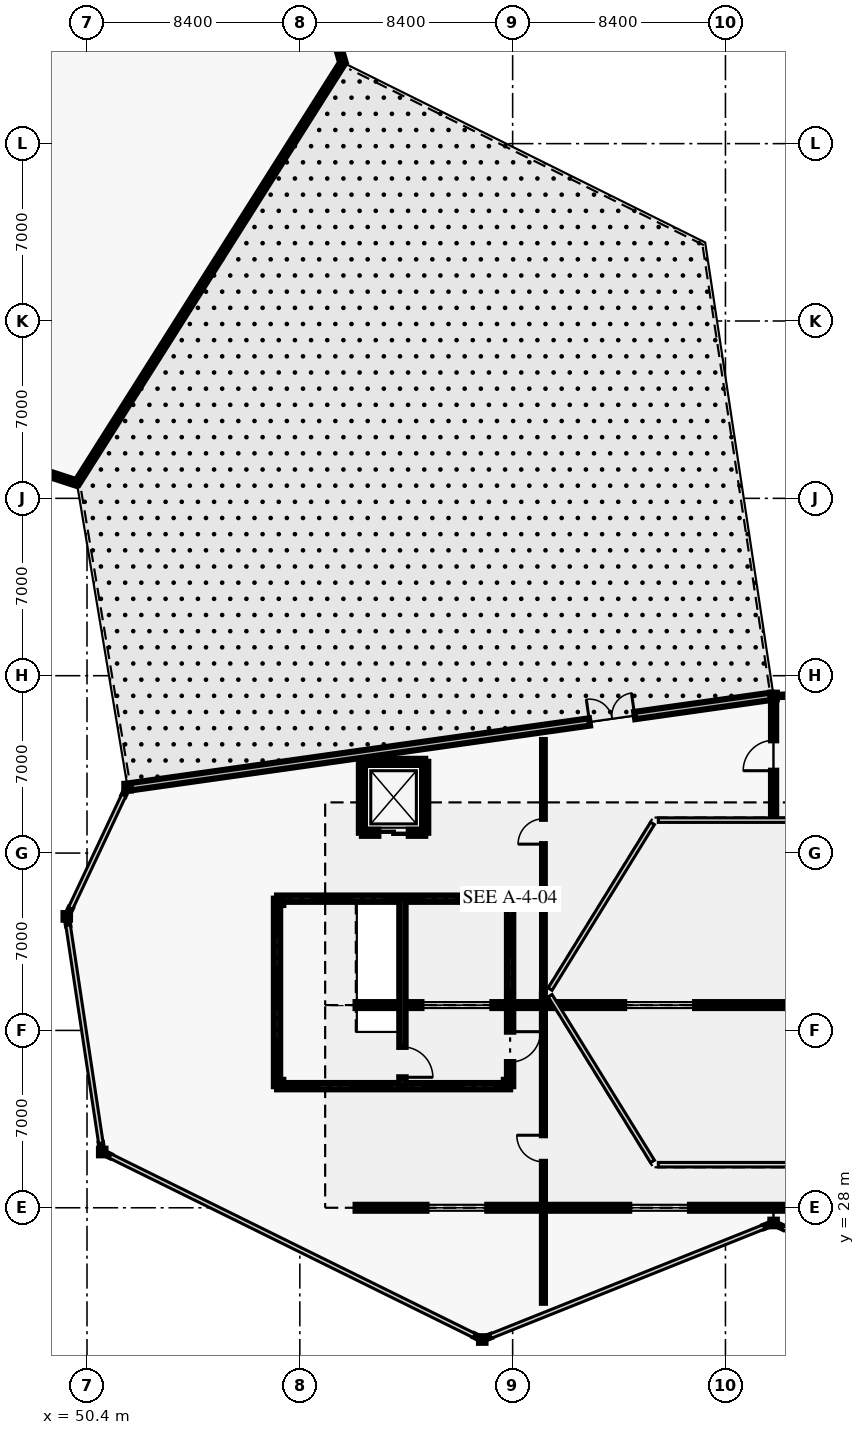
"""IFC4 building model, lengths in metres.
Left out: names, types, materials, properties, quantities, classifications, styles, units other than length and angle.
Written with IfcOpenShell. Run it as: python <this file> out.ifc"""

import sys

from ifc_helpers import new_model, si_unit, direction, frame, frame_2d, origin, origin_2d, place, context, subcontext, project, spatial, rectangle, i_section, extrude, element, fill, save


model = new_model("IFC4")
c1 = context("Model", 3, precision=1e-05, world=origin(), true_north=direction((0.0, 1.0)))
c2 = subcontext(c1, "Body", "Model", "MODEL_VIEW")
j1 = project(units=[si_unit("LENGTHUNIT", "METRE"), si_unit("PLANEANGLEUNIT", "RADIAN")], contexts=[c1])
p1 = place(None, origin())
s1 = spatial("IfcSite", under=j1, at=p1, CompositionType="ELEMENT")
p2 = place(p1, origin())
s2 = spatial("IfcBuilding", under=s1, at=p2, CompositionType="ELEMENT")
p3 = place(p2, frame((0.0, 0.0, 19.8)))
s3 = spatial("IfcBuildingStorey", under=s2, at=p3, CompositionType="ELEMENT", Elevation=19.8)
for number, where, z_axis, x_axis in (
    (1, (49.6, 39.5, 0.0), (0.0, 0.0, 1.0), (1.0, 0.0, 0.0)),
    (2, (51.0, 30.2, 0.0), (0.0, 0.0, 1.0), (1.0, 0.0, 0.0)),
    (3, (52.0, 44.6, 0.0), (0.0, 0.0, 1.0), (1.0, 0.0, 0.0)),
    (4, (66.0, 22.8, 0.0), (0.0, 0.0, 1.0), (1.0, 0.0, 0.0)),
    (5, (77.5, 27.4, 0.0), (0.0, 0.0, 1.0), (1.0, 0.0, 0.0)),
    (6, (77.5, 48.2, 0.0), (0.0, 0.0, 1.0), (1.0, 0.0, 0.0)),
    (7, (58.02, 32.92, 0.0), (0.0, 0.0, 1.0), (1.0, 0.0, 0.0)),
    (8, (66.98, 32.92, 0.0), (0.0, 0.0, 1.0), (1.0, 0.0, 0.0)),
    (9, (66.98, 40.08, 0.0), (0.0, 0.0, 1.0), (1.0, 0.0, 0.0)),
    (10, (58.02, 40.08, 0.0), (0.0, 0.0, 1.0), (1.0, 0.0, 0.0)),
):
    element("IfcColumn", number, at=place(p3, frame(where, z_axis=z_axis, x_axis=x_axis)), inside=s3, PredefinedType="COLUMN", context=c2, shape_type="SweptSolid", body=[
        extrude(i_section(OverallWidth=0.256, OverallDepth=0.26, WebThickness=0.01, FlangeThickness=0.017, FilletRadius=0.013, at=origin_2d()), origin(), (0.0, 0.0, 1.0), 9.0),
    ])
for number, where, z_axis, x_axis in (
    (11, (50.994, 30.242, 0.0), (0.0, 0.0, 1.0), (-0.149, 0.989, 0.0)),
    (12, (49.652, 39.154, 0.0), (0.0, 0.0, 1.0), (-0.15, 0.989, 0.0)),
):
    element("IfcWall", number, at=place(p3, frame(where, z_axis=z_axis, x_axis=x_axis)), inside=s3, PredefinedType="SOLIDWALL", context=c2, shape_type="SweptSolid", body=[
        extrude(rectangle(XDim=0.307, YDim=0.095, at=frame_2d((0.154, 0.0))), origin(), (0.0, 0.0, 1.0), 7.82),
    ])
for number, where, z_axis, x_axis in (
    (13, (65.962, 22.819, 0.0), (0.0, 0.0, 1.0), (-0.897, 0.442, 0.0)),
    (14, (51.314, 30.045, 0.0), (0.0, 0.0, 1.0), (-0.897, 0.442, 0.0)),
):
    element("IfcWall", number, at=place(p3, frame(where, z_axis=z_axis, x_axis=x_axis)), inside=s3, PredefinedType="SOLIDWALL", context=c2, shape_type="SweptSolid", body=[
        extrude(rectangle(XDim=0.308, YDim=0.095, at=frame_2d((0.154, 0.0))), origin(), (0.0, 0.0, 1.0), 7.82),
    ])
p4 = place(p3, frame((77.405, 27.362, 0.0), z_axis=(0.0, 0.0, 1.0), x_axis=(-0.928967856381, -0.370160400111, 0.0)))
e15 = element("IfcWall", 15, at=p4, inside=s3, PredefinedType="SOLIDWALL", context=c2, shape_type="SweptSolid", body=[
    extrude(rectangle(XDim=0.308, YDim=0.095, at=frame_2d((0.154, 0.0))), origin(), (0.0, 0.0, 1.0), 7.82),
])
p5 = place(p3, frame((66.325, 22.93, 0.0), z_axis=(0.0, 0.0, 1.0), x_axis=(-0.928859130521, -0.370433145989, 0.0)))
e16 = element("IfcWall", 16, at=p5, inside=s3, PredefinedType="SOLIDWALL", context=c2, shape_type="SweptSolid", body=[
    extrude(rectangle(XDim=0.308, YDim=0.095, at=frame_2d((0.154, 0.0))), origin(), (0.0, 0.0, 1.0), 7.82),
])
p6 = place(p3, frame((52.0, 44.6, 0.0), z_axis=(0.0, 0.0, 1.0), x_axis=(0.990179648472, 0.139800800256, 0.0)))
e17 = element("IfcWall", 17, at=p6, inside=s3, PredefinedType="SOLIDWALL", context=c2, shape_type="SweptSolid", body=[
    extrude(rectangle(XDim=25.692, YDim=0.29, at=frame_2d((12.846, 0.0))), origin(), (0.0, 0.0, 1.0), 7.82),
])
p7 = place(p6, frame((18.415, 0.0, 0.0)))
e18 = element("IfcOpeningElement", 18, at=p7, cuts=e17, PredefinedType="OPENING", context=c2, shape_type="SweptSolid", body=[
    extrude(rectangle(XDim=1.8, YDim=2.25, at=frame_2d((0.9, 1.125))), frame((0.0, 0.155, 0.0), z_axis=(0.0, -1.0, 0.0), x_axis=(1.0, 0.0, 0.0)), (0.0, 0.0, 1.0), 0.31),
])
for number, where, z_axis, x_axis in (
    (19, (49.618, 39.538, 0.0), (0.0, 0.0, 1.0), (0.426, 0.905, 0.0)),
    (20, (51.851, 44.283, 0.0), (0.0, 0.0, 1.0), (0.425, 0.905, 0.0)),
):
    element("IfcWall", number, at=place(p3, frame(where, z_axis=z_axis, x_axis=x_axis)), inside=s3, PredefinedType="SOLIDWALL", context=c2, shape_type="SweptSolid", body=[
        extrude(rectangle(XDim=0.308, YDim=0.095, at=frame_2d((0.154, 0.0))), origin(), (0.0, 0.0, 1.0), 7.82),
    ])
p8 = place(p3, frame((77.87, 27.223, 0.0), z_axis=(0.0, 0.0, 1.0), x_axis=(-0.902053790555, 0.431623631126, 0.0)))
e21 = element("IfcWall", 21, at=p8, inside=s3, PredefinedType="SOLIDWALL", context=c2, shape_type="SweptSolid", body=[
    extrude(rectangle(XDim=0.308, YDim=0.095, at=frame_2d((0.154, 0.0))), origin(), (0.0, 0.0, 1.0), 7.82),
])
p9 = place(p3, frame((77.602, 48.202, 0.0), z_axis=(0.0, 0.0, 1.0), x_axis=(0.999735659566, 0.022991541735, 0.0)))
e22 = element("IfcWall", 22, at=p9, inside=s3, PredefinedType="SOLIDWALL", context=c2, shape_type="SweptSolid", body=[
    extrude(rectangle(XDim=0.308, YDim=0.095, at=frame_2d((0.154, 0.0))), origin(), (0.0, 0.0, 1.0), 7.82),
])
p10 = place(p3, frame((93.0, 28.0, 8.65), z_axis=(0.0, 0.0, 1.0), x_axis=(-1.0, 0.0, 0.0)))
e23 = element("IfcWall", 23, at=p10, inside=s3, PredefinedType="SOLIDWALL", context=c2, shape_type="SweptSolid", body=[
    extrude(rectangle(XDim=32.0, YDim=0.235, at=frame_2d((16.0, 0.0))), origin(), (0.0, 0.0, 1.0), 3.93),
])
p11 = place(p10, frame((2.8, 0.0, 0.25)))
e24 = element("IfcOpeningElement", 24, at=p11, cuts=e23, PredefinedType="OPENING", context=c2, shape_type="SweptSolid", body=[
    extrude(rectangle(XDim=2.4, YDim=2.2, at=frame_2d((1.2, 1.1))), frame((0.0, 0.127, 0.0), z_axis=(0.0, -1.0, 0.0), x_axis=(1.0, 0.0, 0.0)), (0.0, 0.0, 1.0), 0.255),
])
p12 = place(p10, frame((10.8, 0.0, 0.25)))
e25 = element("IfcOpeningElement", 25, at=p12, cuts=e23, PredefinedType="OPENING", context=c2, shape_type="SweptSolid", body=[
    extrude(rectangle(XDim=2.4, YDim=2.2, at=frame_2d((1.2, 1.1))), frame((0.0, 0.127, 0.0), z_axis=(0.0, -1.0, 0.0), x_axis=(1.0, 0.0, 0.0)), (0.0, 0.0, 1.0), 0.255),
])
p13 = place(p10, frame((18.8, 0.0, 0.25)))
e26 = element("IfcOpeningElement", 26, at=p13, cuts=e23, PredefinedType="OPENING", context=c2, shape_type="SweptSolid", body=[
    extrude(rectangle(XDim=2.4, YDim=2.2, at=frame_2d((1.2, 1.1))), frame((0.0, 0.127, 0.0), z_axis=(0.0, -1.0, 0.0), x_axis=(1.0, 0.0, 0.0)), (0.0, 0.0, 1.0), 0.255),
])
p14 = place(p10, frame((26.8, 0.0, 0.25)))
e27 = element("IfcOpeningElement", 27, at=p14, cuts=e23, PredefinedType="OPENING", context=c2, shape_type="SweptSolid", body=[
    extrude(rectangle(XDim=2.4, YDim=2.2, at=frame_2d((1.2, 1.1))), frame((0.0, 0.127, 0.0), z_axis=(0.0, -1.0, 0.0), x_axis=(1.0, 0.0, 0.0)), (0.0, 0.0, 1.0), 0.255),
])
p15 = place(p3, frame((93.0, 36.0, 8.65), z_axis=(0.0, 0.0, 1.0), x_axis=(-1.0, 0.0, 0.0)))
e28 = element("IfcWall", 28, at=p15, inside=s3, PredefinedType="SOLIDWALL", context=c2, shape_type="SweptSolid", body=[
    extrude(rectangle(XDim=32.0, YDim=0.235, at=frame_2d((16.0, 0.0))), origin(), (0.0, 0.0, 1.0), 3.93),
])
p16 = place(p15, frame((2.6, 0.0, 0.25)))
e29 = element("IfcOpeningElement", 29, at=p16, cuts=e28, PredefinedType="OPENING", context=c2, shape_type="SweptSolid", body=[
    extrude(rectangle(XDim=2.8, YDim=2.2, at=frame_2d((1.4, 1.1))), frame((0.0, 0.127, 0.0), z_axis=(0.0, -1.0, 0.0), x_axis=(1.0, 0.0, 0.0)), (0.0, 0.0, 1.0), 0.255),
])
p17 = place(p15, frame((10.6, 0.0, 0.25)))
e30 = element("IfcOpeningElement", 30, at=p17, cuts=e28, PredefinedType="OPENING", context=c2, shape_type="SweptSolid", body=[
    extrude(rectangle(XDim=2.8, YDim=2.2, at=frame_2d((1.4, 1.1))), frame((0.0, 0.127, 0.0), z_axis=(0.0, -1.0, 0.0), x_axis=(1.0, 0.0, 0.0)), (0.0, 0.0, 1.0), 0.255),
])
p18 = place(p15, frame((18.6, 0.0, 0.25)))
e31 = element("IfcOpeningElement", 31, at=p18, cuts=e28, PredefinedType="OPENING", context=c2, shape_type="SweptSolid", body=[
    extrude(rectangle(XDim=2.8, YDim=2.2, at=frame_2d((1.4, 1.1))), frame((0.0, 0.127, 0.0), z_axis=(0.0, -1.0, 0.0), x_axis=(1.0, 0.0, 0.0)), (0.0, 0.0, 1.0), 0.255),
])
p19 = place(p15, frame((26.6, 0.0, 0.25)))
e32 = element("IfcOpeningElement", 32, at=p19, cuts=e28, PredefinedType="OPENING", context=c2, shape_type="SweptSolid", body=[
    extrude(rectangle(XDim=2.8, YDim=2.2, at=frame_2d((1.4, 1.1))), frame((0.0, 0.127, 0.0), z_axis=(0.0, -1.0, 0.0), x_axis=(1.0, 0.0, 0.0)), (0.0, 0.0, 1.0), 0.255),
])
p20 = place(p3, frame((50.0, 56.6, 0.0), z_axis=(0.0, 0.0, 1.0), x_axis=(0.534570878454, 0.845123645338, 0.0)))
e33 = element("IfcWall", 33, at=p20, inside=s3, PredefinedType="PARAPET", context=c2, shape_type="SweptSolid", body=[
    extrude(rectangle(XDim=19.642, YDim=0.195, at=frame_2d((9.821, 0.0))), origin(), (0.0, 0.0, 1.0), 0.95),
])
p21 = place(p3, frame((60.5, 73.2, 0.0), z_axis=(0.0, 0.0, 1.0), x_axis=(-0.276030822408, 0.96114878405, 0.0)))
e34 = element("IfcWall", 34, at=p21, inside=s3, PredefinedType="PARAPET", context=c2, shape_type="SweptSolid", body=[
    extrude(rectangle(XDim=9.6, YDim=0.215, at=frame_2d((4.8, 0.0))), origin(), (0.0, 0.0, 1.0), 0.95),
])
p22 = place(p3, frame((26.3, 64.3, 0.0), z_axis=(0.0, 0.0, 1.0), x_axis=(0.951063943279, -0.308994135535, 0.0)))
e35 = element("IfcWall", 35, at=p22, inside=s3, PredefinedType="PARAPET", context=c2, shape_type="SweptSolid", body=[
    extrude(rectangle(XDim=24.919, YDim=0.215, at=frame_2d((12.46, 0.0))), origin(), (0.0, 0.0, 1.0), 0.95),
])
p23 = place(p3, frame((77.5, 43.5, 0.0), z_axis=(0.0, 0.0, 1.0), x_axis=(0.0, 1.0, 0.0)))
e36 = element("IfcWall", 36, at=p23, inside=s3, PredefinedType="SOLIDWALL", context=c2, shape_type="SweptSolid", body=[
    extrude(rectangle(XDim=4.7, YDim=0.205, at=frame_2d((2.35, 0.0))), origin(), (0.0, 0.0, 1.0), 7.52),
])
p24 = place(p23, frame((1.75, 0.0, 0.0)))
e37 = element("IfcOpeningElement", 37, at=p24, cuts=e36, PredefinedType="OPENING", context=c2, shape_type="SweptSolid", body=[
    extrude(rectangle(XDim=1.2, YDim=2.2, at=frame_2d((0.6, 1.1))), frame((0.0, 0.113, 0.0), z_axis=(0.0, -1.0, 0.0), x_axis=(1.0, 0.0, 0.0)), (0.0, 0.0, 1.0), 0.225),
])
p25 = place(p3, frame((68.415, 24.251, 0.0), z_axis=(0.0, 0.0, 1.0), x_axis=(0.0, 1.0, 0.0)))
e38 = element("IfcWall", 38, at=p25, inside=s3, PredefinedType="PARTITIONING", context=c2, shape_type="SweptSolid", body=[
    extrude(rectangle(XDim=12.174, YDim=0.12, at=frame_2d((6.087, 0.0))), origin(), (0.0, 0.0, 1.0), 7.52),
])
p26 = place(p25, frame((5.562, 0.0, 0.0)))
e39 = element("IfcOpeningElement", 39, at=p26, cuts=e38, PredefinedType="OPENING", context=c2, shape_type="SweptSolid", body=[
    extrude(rectangle(XDim=1.05, YDim=2.2, at=frame_2d((0.525, 1.1))), frame((0.0, 0.07, 0.0), z_axis=(0.0, -1.0, 0.0), x_axis=(1.0, 0.0, 0.0)), (0.0, 0.0, 1.0), 0.14),
])
p27 = place(p3, frame((68.415, 36.575, 0.0), z_axis=(0.0, 0.0, 1.0), x_axis=(0.0, 1.0, 0.0)))
e40 = element("IfcWall", 40, at=p27, inside=s3, PredefinedType="PARTITIONING", context=c2, shape_type="SweptSolid", body=[
    extrude(rectangle(XDim=9.888, YDim=0.11, at=frame_2d((4.944, 0.0))), origin(), (0.0, 0.0, 1.0), 7.52),
])
p28 = place(p27, frame((5.777, 0.0, 0.0)))
e41 = element("IfcOpeningElement", 41, at=p28, cuts=e40, PredefinedType="OPENING", context=c2, shape_type="SweptSolid", body=[
    extrude(rectangle(XDim=1.0, YDim=2.15, at=frame_2d((0.5, 1.075))), frame((0.0, 0.065, 0.0), z_axis=(0.0, -1.0, 0.0), x_axis=(1.0, 0.0, 0.0)), (0.0, 0.0, 1.0), 0.13),
])
p29 = place(p3, frame((57.9, 32.8, 0.0), z_axis=(0.0, 0.0, 1.0), x_axis=(0.0, 1.0, 0.0)))
e42 = element("IfcWall", 42, at=p29, inside=s3, PredefinedType="SHEAR", context=c2, shape_type="SweptSolid", body=[
    extrude(rectangle(XDim=7.4, YDim=0.25, at=frame_2d((3.7, 0.0))), origin(), (0.0, 0.0, 1.0), 8.76),
])
for number, where, z_axis, x_axis in (
    (43, (57.9, 40.2, 0.0), (0.0, 0.0, 1.0), (1.0, 0.0, 0.0)),
    (44, (67.1, 32.8, 0.0), (0.0, 0.0, 1.0), (-1.0, 0.0, 0.0)),
):
    element("IfcWall", number, at=place(p3, frame(where, z_axis=z_axis, x_axis=x_axis)), inside=s3, PredefinedType="SHEAR", context=c2, shape_type="SweptSolid", body=[
        extrude(rectangle(XDim=9.2, YDim=0.25, at=frame_2d((4.6, 0.0))), origin(), (0.0, 0.0, 1.0), 8.76),
    ])
p30 = place(p3, frame((67.1, 40.2, 0.0), z_axis=(0.0, 0.0, 1.0), x_axis=(0.0, -1.0, 0.0)))
e45 = element("IfcWall", 45, at=p30, inside=s3, PredefinedType="SHEAR", context=c2, shape_type="SweptSolid", body=[
    extrude(rectangle(XDim=7.4, YDim=0.25, at=frame_2d((3.7, 0.0))), origin(), (0.0, 0.0, 1.0), 8.76),
])
p31 = place(p30, frame((5.25, 0.0, 0.0)))
e46 = element("IfcOpeningElement", 46, at=p31, cuts=e45, PredefinedType="OPENING", context=c2, shape_type="SweptSolid", body=[
    extrude(rectangle(XDim=1.2, YDim=2.2, at=frame_2d((0.6, 1.1))), frame((0.0, 0.135, 0.0), z_axis=(0.0, -1.0, 0.0), x_axis=(1.0, 0.0, 0.0)), (0.0, 0.0, 1.0), 0.27),
])
p32 = place(p3, frame((62.85, 40.2, 0.0), z_axis=(0.0, 0.0, 1.0), x_axis=(0.0, -1.0, 0.0)))
e47 = element("IfcWall", 47, at=p32, inside=s3, PredefinedType="SHEAR", context=c2, shape_type="SweptSolid", body=[
    extrude(rectangle(XDim=7.4, YDim=0.25, at=frame_2d((3.7, 0.0))), origin(), (0.0, 0.0, 1.0), 8.76),
])
p33 = place(p32, frame((5.85, 0.0, 0.0)))
e48 = element("IfcOpeningElement", 48, at=p33, cuts=e47, PredefinedType="OPENING", context=c2, shape_type="SweptSolid", body=[
    extrude(rectangle(XDim=1.2, YDim=2.2, at=frame_2d((0.6, 1.1))), frame((0.0, 0.135, 0.0), z_axis=(0.0, -1.0, 0.0), x_axis=(1.0, 0.0, 0.0)), (0.0, 0.0, 1.0), 0.27),
])
p34 = place(p3, frame((61.25, 45.6, 0.0), z_axis=(0.0, 0.0, 1.0), x_axis=(1.0, 0.0, 0.0)))
e49 = element("IfcWall", 49, at=p34, inside=s3, PredefinedType="SHEAR", context=c2, shape_type="SweptSolid", body=[
    extrude(rectangle(XDim=2.5, YDim=0.24, at=frame_2d((1.25, 0.0))), origin(), (0.0, 0.0, 1.0), 10.1),
])
for number, where, z_axis, x_axis in (
    (50, (63.75, 45.6, 0.0), (0.0, 0.0, 1.0), (0.0, -1.0, 0.0)),
    (51, (61.25, 42.8, 0.0), (0.0, 0.0, 1.0), (0.0, 1.0, 0.0)),
):
    element("IfcWall", number, at=place(p3, frame(where, z_axis=z_axis, x_axis=x_axis)), inside=s3, PredefinedType="SHEAR", context=c2, shape_type="SweptSolid", body=[
        extrude(rectangle(XDim=2.8, YDim=0.24, at=frame_2d((1.4, 0.0))), origin(), (0.0, 0.0, 1.0), 10.1),
    ])
p35 = place(p3, frame((63.75, 42.8, 0.0), z_axis=(0.0, 0.0, 1.0), x_axis=(-1.0, 0.0, 0.0)))
e52 = element("IfcWall", 52, at=p35, inside=s3, PredefinedType="SHEAR", context=c2, shape_type="SweptSolid", body=[
    extrude(rectangle(XDim=2.5, YDim=0.24, at=frame_2d((1.25, 0.0))), origin(), (0.0, 0.0, 1.0), 10.1),
])
p36 = place(p35, frame((0.65, 0.0, 0.0)))
e53 = element("IfcOpeningElement", 53, at=p36, cuts=e52, PredefinedType="OPENING", context=c2, shape_type="SweptSolid", body=[
    extrude(rectangle(XDim=1.2, YDim=2.2, at=frame_2d((0.6, 1.1))), frame((0.0, 0.13, 0.0), z_axis=(0.0, -1.0, 0.0), x_axis=(1.0, 0.0, 0.0)), (0.0, 0.0, 1.0), 0.26),
])
p37 = place(p7, origin())
e54 = element("IfcDoor", 54, at=p37, inside=s3, OperationType="DOUBLE_DOOR_SINGLE_SWING", PredefinedType="DOOR", context=c2, shape_type="SweptSolid", body=[
    extrude(rectangle(XDim=1.8, YDim=2.25, at=frame_2d((0.9, 1.125))), frame((0.0, 0.025, 0.0), z_axis=(0.0, -1.0, 0.0), x_axis=(1.0, 0.0, 0.0)), (0.0, 0.0, 1.0), 0.05),
])
fill(e18, e54)
p38 = place(p13, origin())
e55 = element("IfcWindow", 55, at=p38, inside=s3, PartitioningType="SINGLE_PANEL", PredefinedType="SKYLIGHT", context=c2, shape_type="SweptSolid", body=[
    extrude(rectangle(XDim=2.4, YDim=2.2, at=frame_2d((1.2, 1.1))), frame((0.0, 0.03, 0.0), z_axis=(0.0, -1.0, 0.0), x_axis=(1.0, 0.0, 0.0)), (0.0, 0.0, 1.0), 0.06),
])
fill(e26, e55)
p39 = place(p14, origin())
e56 = element("IfcWindow", 56, at=p39, inside=s3, PartitioningType="SINGLE_PANEL", PredefinedType="SKYLIGHT", context=c2, shape_type="SweptSolid", body=[
    extrude(rectangle(XDim=2.4, YDim=2.2, at=frame_2d((1.2, 1.1))), frame((0.0, 0.03, 0.0), z_axis=(0.0, -1.0, 0.0), x_axis=(1.0, 0.0, 0.0)), (0.0, 0.0, 1.0), 0.06),
])
fill(e27, e56)
p40 = place(p18, origin())
e57 = element("IfcWindow", 57, at=p40, inside=s3, PartitioningType="SINGLE_PANEL", PredefinedType="SKYLIGHT", context=c2, shape_type="SweptSolid", body=[
    extrude(rectangle(XDim=2.8, YDim=2.2, at=frame_2d((1.4, 1.1))), frame((0.0, 0.03, 0.0), z_axis=(0.0, -1.0, 0.0), x_axis=(1.0, 0.0, 0.0)), (0.0, 0.0, 1.0), 0.06),
])
fill(e31, e57)
p41 = place(p19, origin())
e58 = element("IfcWindow", 58, at=p41, inside=s3, PartitioningType="SINGLE_PANEL", PredefinedType="SKYLIGHT", context=c2, shape_type="SweptSolid", body=[
    extrude(rectangle(XDim=2.8, YDim=2.2, at=frame_2d((1.4, 1.1))), frame((0.0, 0.03, 0.0), z_axis=(0.0, -1.0, 0.0), x_axis=(1.0, 0.0, 0.0)), (0.0, 0.0, 1.0), 0.06),
])
fill(e32, e58)
p42 = place(p24, origin())
e59 = element("IfcDoor", 59, at=p42, inside=s3, OperationType="SINGLE_SWING_LEFT", PredefinedType="DOOR", context=c2, shape_type="SweptSolid", body=[
    extrude(rectangle(XDim=1.2, YDim=2.2, at=frame_2d((0.6, 1.1))), frame((0.0, 0.025, 0.0), z_axis=(0.0, -1.0, 0.0), x_axis=(1.0, 0.0, 0.0)), (0.0, 0.0, 1.0), 0.05),
])
fill(e37, e59)
p43 = place(p26, origin())
e60 = element("IfcDoor", 60, at=p43, inside=s3, OperationType="SINGLE_SWING_RIGHT", PredefinedType="DOOR", context=c2, shape_type="SweptSolid", body=[
    extrude(rectangle(XDim=1.05, YDim=2.2, at=frame_2d((0.525, 1.1))), frame((0.0, 0.025, 0.0), z_axis=(0.0, -1.0, 0.0), x_axis=(1.0, 0.0, 0.0)), (0.0, 0.0, 1.0), 0.05),
])
fill(e39, e60)
p44 = place(p28, origin())
e61 = element("IfcDoor", 61, at=p44, inside=s3, OperationType="SINGLE_SWING_LEFT", PredefinedType="DOOR", context=c2, shape_type="SweptSolid", body=[
    extrude(rectangle(XDim=1.0, YDim=2.15, at=frame_2d((0.5, 1.075))), frame((0.0, 0.025, 0.0), z_axis=(0.0, -1.0, 0.0), x_axis=(1.0, 0.0, 0.0)), (0.0, 0.0, 1.0), 0.05),
])
fill(e41, e61)
p45 = place(p31, origin())
e62 = element("IfcDoor", 62, at=p45, inside=s3, OperationType="SINGLE_SWING_LEFT", PredefinedType="DOOR", context=c2, shape_type="SweptSolid", body=[
    extrude(rectangle(XDim=1.2, YDim=2.2, at=frame_2d((0.6, 1.1))), frame((0.0, 0.025, 0.0), z_axis=(0.0, -1.0, 0.0), x_axis=(1.0, 0.0, 0.0)), (0.0, 0.0, 1.0), 0.05),
])
fill(e46, e62)
p46 = place(p33, origin())
e63 = element("IfcDoor", 63, at=p46, inside=s3, OperationType="SINGLE_SWING_RIGHT", PredefinedType="DOOR", context=c2, shape_type="SweptSolid", body=[
    extrude(rectangle(XDim=1.2, YDim=2.2, at=frame_2d((0.6, 1.1))), frame((0.0, 0.025, 0.0), z_axis=(0.0, -1.0, 0.0), x_axis=(1.0, 0.0, 0.0)), (0.0, 0.0, 1.0), 0.05),
])
fill(e48, e63)
p47 = place(p36, origin())
e64 = element("IfcDoor", 64, at=p47, inside=s3, OperationType="SLIDING_TO_LEFT", PredefinedType="DOOR", context=c2, shape_type="SweptSolid", body=[
    extrude(rectangle(XDim=1.2, YDim=2.2, at=frame_2d((0.6, 1.1))), frame((0.0, 0.025, 0.0), z_axis=(0.0, -1.0, 0.0), x_axis=(1.0, 0.0, 0.0)), (0.0, 0.0, 1.0), 0.05),
])
fill(e53, e64)
save(model, sys.argv[1])
